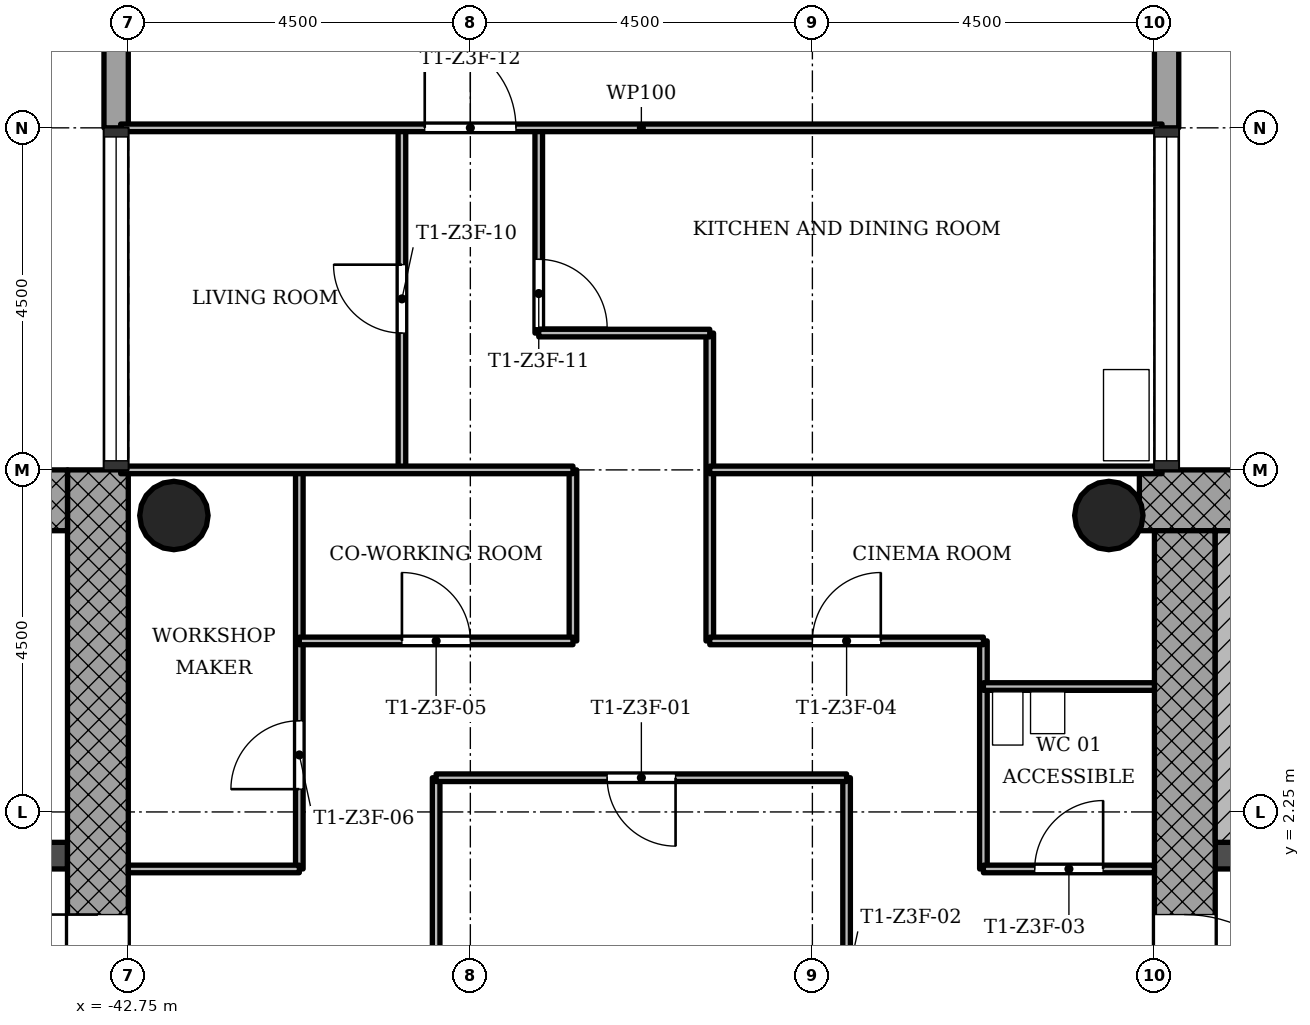
"""IFC4 building model, lengths in metres.
Left out: names, types, materials, properties, quantities, classifications, styles, units other than length and angle.
Written with IfcOpenShell. Run it as: python <this file> out.ifc"""

import sys

from ifc_helpers import new_model, si_unit, direction, frame, frame_2d, origin, origin_2d, place, context, subcontext, project, spatial, rectangle, hollow_circle, extrude, element, fill, save


model = new_model("IFC4")
c1 = context("Model", 3, precision=1e-05, world=origin(), true_north=direction((0.0, 1.0)))
c2 = subcontext(c1, "Body", "Model", "MODEL_VIEW")
j1 = project(units=[si_unit("LENGTHUNIT", "METRE"), si_unit("PLANEANGLEUNIT", "RADIAN")], contexts=[c1])
p1 = place(None, origin())
s1 = spatial("IfcSite", under=j1, at=p1, CompositionType="ELEMENT")
p2 = place(p1, origin())
s2 = spatial("IfcBuilding", under=s1, at=p2, CompositionType="ELEMENT")
p3 = place(p2, frame((0.0, 0.0, 171.1)))
s3 = spatial("IfcBuildingStorey", under=s2, at=p3, CompositionType="ELEMENT", Elevation=171.1)
p4 = place(p3, frame((-20.652, 6.35, 0.0), z_axis=(0.0, 0.0, 1.0), x_axis=(-1.0, 0.0, 0.0)))
e1 = element("IfcWall", 1, at=p4, inside=s3, PredefinedType="SHEAR", context=c2, shape_type="SweptSolid", body=[
    extrude(rectangle(XDim=8.796, YDim=0.8, at=frame_2d((4.398, 0.0))), origin(), (0.0, 0.0, 1.0), 3.4),
])
p5 = place(p3, frame((-28.85, 5.95, 0.0), z_axis=(0.0, 0.0, 1.0), x_axis=(0.0, -1.0, 0.0)))
e2 = element("IfcWall", 2, at=p5, inside=s3, PredefinedType="SHEAR", context=c2, shape_type="SweptSolid", body=[
    extrude(rectangle(XDim=12.7, YDim=0.8, at=frame_2d((6.35, 0.0))), origin(), (0.0, 0.0, 1.0), 3.4),
])
p6 = place(p5, frame((5.05, 0.0, 0.0)))
e3 = element("IfcOpeningElement", 3, at=p6, cuts=e2, PredefinedType="OPENING", context=c2, shape_type="SweptSolid", body=[
    extrude(rectangle(XDim=1.8, YDim=2.1, at=frame_2d((0.9, 1.05))), frame((0.0, 0.41, 0.0), z_axis=(0.0, -1.0, 0.0), x_axis=(1.0, 0.0, 0.0)), (0.0, 0.0, 1.0), 0.82),
])
p7 = place(p3, frame((-28.45, 1.675, 0.0), z_axis=(0.0, 0.0, 1.0), x_axis=(1.0, 0.0, 0.0)))
e4 = element("IfcWall", 4, at=p7, inside=s3, PredefinedType="SHEAR", context=c2, shape_type="SweptSolid", body=[
    extrude(rectangle(XDim=7.4, YDim=0.35, at=frame_2d((3.7, 0.0))), origin(), (0.0, 0.0, 1.0), 3.4),
])
p8 = place(p7, frame((0.85, 0.0, 0.0)))
e5 = element("IfcOpeningElement", 5, at=p8, cuts=e4, PredefinedType="OPENING", context=c2, shape_type="SweptSolid", body=[
    extrude(rectangle(XDim=0.9, YDim=2.1, at=frame_2d((0.45, 1.05))), frame((0.0, 0.185, 0.0), z_axis=(0.0, -1.0, 0.0), x_axis=(1.0, 0.0, 0.0)), (0.0, 0.0, 1.0), 0.37),
])
p9 = place(p3, frame((-43.15, -5.95, 0.0), z_axis=(0.0, 0.0, 1.0), x_axis=(0.0, 1.0, 0.0)))
e6 = element("IfcWall", 6, at=p9, inside=s3, PredefinedType="SHEAR", context=c2, shape_type="SweptSolid", body=[
    extrude(rectangle(XDim=12.7, YDim=0.8, at=frame_2d((6.35, 0.0))), origin(), (0.0, 0.0, 1.0), 3.4),
])
p10 = place(p9, frame((5.05, 0.0, 0.0)))
e7 = element("IfcOpeningElement", 7, at=p10, cuts=e6, PredefinedType="OPENING", context=c2, shape_type="SweptSolid", body=[
    extrude(rectangle(XDim=1.8, YDim=2.1, at=frame_2d((0.9, 1.05))), frame((0.0, 0.41, 0.0), z_axis=(0.0, -1.0, 0.0), x_axis=(1.0, 0.0, 0.0)), (0.0, 0.0, 1.0), 0.82),
])
p11 = place(p3, frame((-43.55, 6.35, 0.0), z_axis=(0.0, 0.0, 1.0), x_axis=(-1.0, 0.0, 0.0)))
e8 = element("IfcWall", 8, at=p11, inside=s3, PredefinedType="SHEAR", context=c2, shape_type="SweptSolid", body=[
    extrude(rectangle(XDim=8.2, YDim=0.8, at=frame_2d((4.1, 0.0))), origin(), (0.0, 0.0, 1.0), 3.4),
])
p12 = place(p3, frame((-50.95, 1.675, 0.0), z_axis=(0.0, 0.0, 1.0), x_axis=(1.0, 0.0, 0.0)))
e9 = element("IfcWall", 9, at=p12, inside=s3, PredefinedType="SHEAR", context=c2, shape_type="SweptSolid", body=[
    extrude(rectangle(XDim=7.4, YDim=0.35, at=frame_2d((3.7, 0.0))), origin(), (0.0, 0.0, 1.0), 3.4),
])
p13 = place(p12, frame((5.35, 0.0, 0.0)))
e10 = element("IfcOpeningElement", 10, at=p13, cuts=e9, PredefinedType="OPENING", context=c2, shape_type="SweptSolid", body=[
    extrude(rectangle(XDim=1.1, YDim=2.1, at=frame_2d((0.55, 1.05))), frame((0.0, 0.185, 0.0), z_axis=(0.0, -1.0, 0.0), x_axis=(1.0, 0.0, 0.0)), (0.0, 0.0, 1.0), 0.37),
])
p14 = place(p12, frame((1.0, 0.0, 0.0)))
e11 = element("IfcOpeningElement", 11, at=p14, cuts=e9, PredefinedType="OPENING", context=c2, shape_type="SweptSolid", body=[
    extrude(rectangle(XDim=1.1, YDim=2.1, at=frame_2d((0.55, 1.05))), frame((0.0, 0.185, 0.0), z_axis=(0.0, -1.0, 0.0), x_axis=(1.0, 0.0, 0.0)), (0.0, 0.0, 1.0), 0.37),
])
p15 = place(p12, frame((3.3, 0.0, 0.0)))
e12 = element("IfcOpeningElement", 12, at=p15, cuts=e9, PredefinedType="OPENING", context=c2, shape_type="SweptSolid", body=[
    extrude(rectangle(XDim=0.9, YDim=2.1, at=frame_2d((0.45, 1.05))), frame((0.0, 0.185, 0.0), z_axis=(0.0, -1.0, 0.0), x_axis=(1.0, 0.0, 0.0)), (0.0, 0.0, 1.0), 0.37),
])
for number, where, z_axis, x_axis in (
    (13, (-29.85, 6.15, 0.0), (0.0, 0.0, 1.0), (1.0, 0.0, 0.0)),
    (14, (-42.15, 6.15, 0.0), (0.0, 0.0, 1.0), (1.0, 0.0, 0.0)),
):
    element("IfcColumn", number, at=place(p3, frame(where, z_axis=z_axis, x_axis=x_axis)), inside=s3, PredefinedType="COLUMN", context=c2, shape_type="SweptSolid", body=[
        extrude(hollow_circle(Radius=0.45, WallThickness=0.032, at=origin_2d()), origin(), (0.0, 0.0, 1.0), 3.4),
    ])
p16 = place(p3, frame((-29.09, 11.25, -0.3), z_axis=(0.0, 0.0, 1.0), x_axis=(0.0, 1.0, 0.0)))
e15 = element("IfcWall", 15, at=p16, inside=s3, PredefinedType="STANDARD", context=c2, shape_type="SweptSolid", body=[
    extrude(rectangle(XDim=1.82, YDim=0.32, at=frame_2d((0.91, 0.0))), origin(), (0.0, 0.0, 1.0), 3.4),
])
p17 = place(p3, frame((-42.91, 12.75, -0.3), z_axis=(0.0, 0.0, 1.0), x_axis=(0.0, -1.0, 0.0)))
e16 = element("IfcWall", 16, at=p17, inside=s3, PredefinedType="STANDARD", context=c2, shape_type="SweptSolid", body=[
    extrude(rectangle(XDim=1.5, YDim=0.32, at=frame_2d((0.75, 0.0))), origin(), (0.0, 0.0, 1.0), 3.4),
])
p18 = place(p3, frame((-40.5, 1.5, 0.0), z_axis=(0.0, 0.0, 1.0), x_axis=(0.0, 1.0, 0.0)))
e17 = element("IfcWall", 17, at=p18, inside=s3, PredefinedType="PARTITIONING", context=c2, shape_type="SweptSolid", body=[
    extrude(rectangle(XDim=5.25, YDim=0.1, at=frame_2d((2.625, 0.0))), origin(), (0.0, 0.0, 1.0), 3.0),
])
p19 = place(p18, frame((1.05, 0.0, 0.0)))
e18 = element("IfcOpeningElement", 18, at=p19, cuts=e17, PredefinedType="OPENING", context=c2, shape_type="SweptSolid", body=[
    extrude(rectangle(XDim=0.9, YDim=2.1, at=frame_2d((0.45, 1.05))), frame((0.0, 0.06, 0.0), z_axis=(0.0, -1.0, 0.0), x_axis=(1.0, 0.0, 0.0)), (0.0, 0.0, 1.0), 0.12),
])
p20 = place(p3, frame((-39.15, 6.75, 0.0), z_axis=(0.0, 0.0, 1.0), x_axis=(0.0, 1.0, 0.0)))
e19 = element("IfcWall", 19, at=p20, inside=s3, PredefinedType="PARTITIONING", context=c2, shape_type="SweptSolid", body=[
    extrude(rectangle(XDim=4.5, YDim=0.1, at=frame_2d((2.25, 0.0))), origin(), (0.0, 0.0, 1.0), 3.0),
])
p21 = place(p20, frame((1.8, 0.0, 0.0)))
e20 = element("IfcOpeningElement", 20, at=p21, cuts=e19, PredefinedType="OPENING", context=c2, shape_type="SweptSolid", body=[
    extrude(rectangle(XDim=0.9, YDim=2.1, at=frame_2d((0.45, 1.05))), frame((0.0, 0.06, 0.0), z_axis=(0.0, -1.0, 0.0), x_axis=(1.0, 0.0, 0.0)), (0.0, 0.0, 1.0), 0.12),
])
p22 = place(p3, frame((-38.7, -2.7, 0.0), z_axis=(0.0, 0.0, 1.0), x_axis=(0.0, 1.0, 0.0)))
e21 = element("IfcWall", 21, at=p22, inside=s3, PredefinedType="PARTITIONING", context=c2, shape_type="SweptSolid", body=[
    extrude(rectangle(XDim=5.4, YDim=0.1, at=frame_2d((2.7, 0.0))), origin(), (0.0, 0.0, 1.0), 3.0),
])
p23 = place(p3, frame((-37.35, 8.55, 0.0), z_axis=(0.0, 0.0, 1.0), x_axis=(0.0, 1.0, 0.0)))
e22 = element("IfcWall", 22, at=p23, inside=s3, PredefinedType="PARTITIONING", context=c2, shape_type="SweptSolid", body=[
    extrude(rectangle(XDim=2.7, YDim=0.1, at=frame_2d((1.35, 0.0))), origin(), (0.0, 0.0, 1.0), 3.0),
])
p24 = place(p23, frame((0.07, 0.0, 0.0)))
e23 = element("IfcOpeningElement", 23, at=p24, cuts=e22, PredefinedType="OPENING", context=c2, shape_type="SweptSolid", body=[
    extrude(rectangle(XDim=0.9, YDim=2.1, at=frame_2d((0.45, 1.05))), frame((0.0, 0.06, 0.0), z_axis=(0.0, -1.0, 0.0), x_axis=(1.0, 0.0, 0.0)), (0.0, 0.0, 1.0), 0.12),
])
p25 = place(p3, frame((-36.9, 4.5, 0.0), z_axis=(0.0, 0.0, 1.0), x_axis=(0.0, 1.0, 0.0)))
e24 = element("IfcWall", 24, at=p25, inside=s3, PredefinedType="PARTITIONING", context=c2, shape_type="SweptSolid", body=[
    extrude(rectangle(XDim=2.25, YDim=0.1, at=frame_2d((1.125, 0.0))), origin(), (0.0, 0.0, 1.0), 3.0),
])
p26 = place(p3, frame((-35.1, 4.5, 0.0), z_axis=(0.0, 0.0, 1.0), x_axis=(0.0, 1.0, 0.0)))
e25 = element("IfcWall", 25, at=p26, inside=s3, PredefinedType="PARTITIONING", context=c2, shape_type="SweptSolid", body=[
    extrude(rectangle(XDim=4.05, YDim=0.1, at=frame_2d((2.025, 0.0))), origin(), (0.0, 0.0, 1.0), 3.0),
])
p27 = place(p3, frame((-33.3, -2.7, 0.0), z_axis=(0.0, 0.0, 1.0), x_axis=(0.0, 1.0, 0.0)))
e26 = element("IfcWall", 26, at=p27, inside=s3, PredefinedType="PARTITIONING", context=c2, shape_type="SweptSolid", body=[
    extrude(rectangle(XDim=5.4, YDim=0.1, at=frame_2d((2.7, 0.0))), origin(), (0.0, 0.0, 1.0), 3.0),
])
p28 = place(p27, frame((2.25, 0.0, 0.0)))
e27 = element("IfcOpeningElement", 27, at=p28, cuts=e26, PredefinedType="OPENING", context=c2, shape_type="SweptSolid", body=[
    extrude(rectangle(XDim=0.9, YDim=2.1, at=frame_2d((0.45, 1.05))), frame((0.0, 0.06, 0.0), z_axis=(0.0, -1.0, 0.0), x_axis=(1.0, 0.0, 0.0)), (0.0, 0.0, 1.0), 0.12),
])
p29 = place(p3, frame((-31.5, 1.5, 0.0), z_axis=(0.0, 0.0, 1.0), x_axis=(0.0, 1.0, 0.0)))
e28 = element("IfcWall", 28, at=p29, inside=s3, PredefinedType="PARTITIONING", context=c2, shape_type="SweptSolid", body=[
    extrude(rectangle(XDim=3.0, YDim=0.1, at=frame_2d((1.5, 0.0))), origin(), (0.0, 0.0, 1.0), 3.0),
])
p30 = place(p3, frame((-42.75, 1.5, 0.0), z_axis=(0.0, 0.0, 1.0), x_axis=(1.0, 0.0, 0.0)))
e29 = element("IfcWall", 29, at=p30, inside=s3, PredefinedType="PARTITIONING", context=c2, shape_type="SweptSolid", body=[
    extrude(rectangle(XDim=2.25, YDim=0.1, at=frame_2d((1.125, 0.0))), origin(), (0.0, 0.0, 1.0), 3.0),
])
p31 = place(p3, frame((-31.5, 1.5, 0.0), z_axis=(0.0, 0.0, 1.0), x_axis=(1.0, 0.0, 0.0)))
e30 = element("IfcWall", 30, at=p31, inside=s3, PredefinedType="PARTITIONING", context=c2, shape_type="SweptSolid", body=[
    extrude(rectangle(XDim=2.25, YDim=0.1, at=frame_2d((1.125, 0.0))), origin(), (0.0, 0.0, 1.0), 3.0),
])
p32 = place(p31, frame((0.675, 0.0, 0.0)))
e31 = element("IfcOpeningElement", 31, at=p32, cuts=e30, PredefinedType="OPENING", context=c2, shape_type="SweptSolid", body=[
    extrude(rectangle(XDim=0.9, YDim=2.1, at=frame_2d((0.45, 1.05))), frame((0.0, 0.06, 0.0), z_axis=(0.0, -1.0, 0.0), x_axis=(1.0, 0.0, 0.0)), (0.0, 0.0, 1.0), 0.12),
])
p33 = place(p3, frame((-38.7, 2.7, 0.0), z_axis=(0.0, 0.0, 1.0), x_axis=(1.0, 0.0, 0.0)))
e32 = element("IfcWall", 32, at=p33, inside=s3, PredefinedType="PARTITIONING", context=c2, shape_type="SweptSolid", body=[
    extrude(rectangle(XDim=5.4, YDim=0.1, at=frame_2d((2.7, 0.0))), origin(), (0.0, 0.0, 1.0), 3.0),
])
p34 = place(p33, frame((2.25, 0.0, 0.0)))
e33 = element("IfcOpeningElement", 33, at=p34, cuts=e32, PredefinedType="OPENING", context=c2, shape_type="SweptSolid", body=[
    extrude(rectangle(XDim=0.9, YDim=2.1, at=frame_2d((0.45, 1.05))), frame((0.0, 0.06, 0.0), z_axis=(0.0, -1.0, 0.0), x_axis=(1.0, 0.0, 0.0)), (0.0, 0.0, 1.0), 0.12),
])
p35 = place(p3, frame((-31.5, 3.9, 0.0), z_axis=(0.0, 0.0, 1.0), x_axis=(1.0, 0.0, 0.0)))
e34 = element("IfcWall", 34, at=p35, inside=s3, PredefinedType="PARTITIONING", context=c2, shape_type="SweptSolid", body=[
    extrude(rectangle(XDim=2.25, YDim=0.1, at=frame_2d((1.125, 0.0))), origin(), (0.0, 0.0, 1.0), 3.0),
])
p36 = place(p3, frame((-40.5, 4.5, 0.0), z_axis=(0.0, 0.0, 1.0), x_axis=(1.0, 0.0, 0.0)))
e35 = element("IfcWall", 35, at=p36, inside=s3, PredefinedType="PARTITIONING", context=c2, shape_type="SweptSolid", body=[
    extrude(rectangle(XDim=3.6, YDim=0.1, at=frame_2d((1.8, 0.0))), origin(), (0.0, 0.0, 1.0), 3.0),
])
p37 = place(p36, frame((1.35, 0.0, 0.0)))
e36 = element("IfcOpeningElement", 36, at=p37, cuts=e35, PredefinedType="OPENING", context=c2, shape_type="SweptSolid", body=[
    extrude(rectangle(XDim=0.9, YDim=2.1, at=frame_2d((0.45, 1.05))), frame((0.0, 0.06, 0.0), z_axis=(0.0, -1.0, 0.0), x_axis=(1.0, 0.0, 0.0)), (0.0, 0.0, 1.0), 0.12),
])
p38 = place(p3, frame((-35.1, 4.5, 0.0), z_axis=(0.0, 0.0, 1.0), x_axis=(1.0, 0.0, 0.0)))
e37 = element("IfcWall", 37, at=p38, inside=s3, PredefinedType="PARTITIONING", context=c2, shape_type="SweptSolid", body=[
    extrude(rectangle(XDim=3.6, YDim=0.1, at=frame_2d((1.8, 0.0))), origin(), (0.0, 0.0, 1.0), 3.0),
])
p39 = place(p38, frame((1.35, 0.0, 0.0)))
e38 = element("IfcOpeningElement", 38, at=p39, cuts=e37, PredefinedType="OPENING", context=c2, shape_type="SweptSolid", body=[
    extrude(rectangle(XDim=0.9, YDim=2.1, at=frame_2d((0.45, 1.05))), frame((0.0, 0.06, 0.0), z_axis=(0.0, -1.0, 0.0), x_axis=(1.0, 0.0, 0.0)), (0.0, 0.0, 1.0), 0.12),
])
for number, where, z_axis, x_axis in (
    (39, (-42.85, 6.75, 0.0), (0.0, 0.0, 1.0), (1.0, 0.0, 0.0)),
    (40, (-35.1, 6.75, 0.0), (0.0, 0.0, 1.0), (1.0, 0.0, 0.0)),
):
    element("IfcWall", number, at=place(p3, frame(where, z_axis=z_axis, x_axis=x_axis)), inside=s3, PredefinedType="PARTITIONING", context=c2, shape_type="SweptSolid", body=[
        extrude(rectangle(XDim=5.95, YDim=0.1, at=frame_2d((2.975, 0.0))), origin(), (0.0, 0.0, 1.0), 3.0),
    ])
p40 = place(p3, frame((-37.35, 8.55, 0.0), z_axis=(0.0, 0.0, 1.0), x_axis=(1.0, 0.0, 0.0)))
e41 = element("IfcWall", 41, at=p40, inside=s3, PredefinedType="PARTITIONING", context=c2, shape_type="SweptSolid", body=[
    extrude(rectangle(XDim=2.25, YDim=0.1, at=frame_2d((1.125, 0.0))), origin(), (0.0, 0.0, 1.0), 3.0),
])
p41 = place(p3, frame((-42.85, 11.25, 0.0), z_axis=(0.0, 0.0, 1.0), x_axis=(1.0, 0.0, 0.0)))
e42 = element("IfcWall", 42, at=p41, inside=s3, PredefinedType="PARTITIONING", context=c2, shape_type="SweptSolid", body=[
    extrude(rectangle(XDim=13.7, YDim=0.1, at=frame_2d((6.85, 0.0))), origin(), (0.0, 0.0, 1.0), 3.0),
])
p42 = place(p41, frame((4.0, 0.0, 0.0)))
e43 = element("IfcOpeningElement", 43, at=p42, cuts=e42, PredefinedType="OPENING", context=c2, shape_type="SweptSolid", body=[
    extrude(rectangle(XDim=1.2, YDim=2.1, at=frame_2d((0.6, 1.05))), frame((0.0, 0.06, 0.0), z_axis=(0.0, -1.0, 0.0), x_axis=(1.0, 0.0, 0.0)), (0.0, 0.0, 1.0), 0.12),
])
p43 = place(p3, frame((-28.25, 1.85, 0.0), z_axis=(0.0, 0.0, 1.0), x_axis=(0.0, 1.0, 0.0)))
e44 = element("IfcWall", 44, at=p43, inside=s3, PredefinedType="SHEAR", context=c2, shape_type="SweptSolid", body=[
    extrude(rectangle(XDim=4.1, YDim=0.4, at=frame_2d((2.05, 0.0))), origin(), (0.0, 0.0, 1.0), 3.4),
])
p44 = place(p34, origin())
e45 = element("IfcDoor", 45, at=p44, inside=s3, OperationType="SINGLE_SWING_RIGHT", PredefinedType="DOOR", context=c2, shape_type="SweptSolid", body=[
    extrude(rectangle(XDim=0.9, YDim=2.1, at=frame_2d((0.45, 1.05))), frame((0.0, 0.025, 0.0), z_axis=(0.0, -1.0, 0.0), x_axis=(1.0, 0.0, 0.0)), (0.0, 0.0, 1.0), 0.05),
])
fill(e33, e45)
p45 = place(p32, origin())
e46 = element("IfcDoor", 46, at=p45, inside=s3, OperationType="SINGLE_SWING_LEFT", PredefinedType="DOOR", context=c2, shape_type="SweptSolid", body=[
    extrude(rectangle(XDim=0.9, YDim=2.1, at=frame_2d((0.45, 1.05))), frame((0.0, 0.025, 0.0), z_axis=(0.0, -1.0, 0.0), x_axis=(1.0, 0.0, 0.0)), (0.0, 0.0, 1.0), 0.05),
])
fill(e31, e46)
p46 = place(p39, origin())
e47 = element("IfcDoor", 47, at=p46, inside=s3, OperationType="SINGLE_SWING_LEFT", PredefinedType="DOOR", context=c2, shape_type="SweptSolid", body=[
    extrude(rectangle(XDim=0.9, YDim=2.1, at=frame_2d((0.45, 1.05))), frame((0.0, 0.025, 0.0), z_axis=(0.0, -1.0, 0.0), x_axis=(1.0, 0.0, 0.0)), (0.0, 0.0, 1.0), 0.05),
])
fill(e38, e47)
p47 = place(p37, origin())
e48 = element("IfcDoor", 48, at=p47, inside=s3, OperationType="SINGLE_SWING_RIGHT", PredefinedType="DOOR", context=c2, shape_type="SweptSolid", body=[
    extrude(rectangle(XDim=0.9, YDim=2.1, at=frame_2d((0.45, 1.05))), frame((0.0, 0.025, 0.0), z_axis=(0.0, -1.0, 0.0), x_axis=(1.0, 0.0, 0.0)), (0.0, 0.0, 1.0), 0.05),
])
fill(e36, e48)
p48 = place(p19, origin())
e49 = element("IfcDoor", 49, at=p48, inside=s3, OperationType="SINGLE_SWING_RIGHT", PredefinedType="DOOR", context=c2, shape_type="SweptSolid", body=[
    extrude(rectangle(XDim=0.9, YDim=2.1, at=frame_2d((0.45, 1.05))), frame((0.0, 0.025, 0.0), z_axis=(0.0, -1.0, 0.0), x_axis=(1.0, 0.0, 0.0)), (0.0, 0.0, 1.0), 0.05),
])
fill(e18, e49)
p49 = place(p21, origin())
e50 = element("IfcDoor", 50, at=p49, inside=s3, OperationType="SINGLE_SWING_LEFT", PredefinedType="DOOR", context=c2, shape_type="SweptSolid", body=[
    extrude(rectangle(XDim=0.9, YDim=2.1, at=frame_2d((0.45, 1.05))), frame((0.0, 0.025, 0.0), z_axis=(0.0, -1.0, 0.0), x_axis=(1.0, 0.0, 0.0)), (0.0, 0.0, 1.0), 0.05),
])
fill(e20, e50)
p50 = place(p24, origin())
e51 = element("IfcDoor", 51, at=p50, inside=s3, OperationType="SINGLE_SWING_LEFT", PredefinedType="DOOR", context=c2, shape_type="SweptSolid", body=[
    extrude(rectangle(XDim=0.9, YDim=2.1, at=frame_2d((0.45, 1.05))), frame((0.0, 0.025, 0.0), z_axis=(0.0, -1.0, 0.0), x_axis=(1.0, 0.0, 0.0)), (0.0, 0.0, 1.0), 0.05),
])
fill(e23, e51)
p51 = place(p42, origin())
e52 = element("IfcDoor", 52, at=p51, inside=s3, OperationType="SINGLE_SWING_RIGHT", PredefinedType="DOOR", context=c2, shape_type="SweptSolid", body=[
    extrude(rectangle(XDim=1.2, YDim=2.1, at=frame_2d((0.6, 1.05))), frame((0.0, 0.025, 0.0), z_axis=(0.0, -1.0, 0.0), x_axis=(1.0, 0.0, 0.0)), (0.0, 0.0, 1.0), 0.05),
])
fill(e43, e52)
p52 = place(p6, origin())
e53 = element("IfcDoor", 53, at=p52, inside=s3, OperationType="SINGLE_SWING_LEFT", PredefinedType="DOOR", context=c2, shape_type="SweptSolid", body=[
    extrude(rectangle(XDim=1.8, YDim=2.1, at=frame_2d((0.9, 1.05))), frame((0.0, 0.025, 0.0), z_axis=(0.0, -1.0, 0.0), x_axis=(1.0, 0.0, 0.0)), (0.0, 0.0, 1.0), 0.05),
])
fill(e3, e53)
p53 = place(p10, origin())
e54 = element("IfcDoor", 54, at=p53, inside=s3, OperationType="SINGLE_SWING_LEFT", PredefinedType="DOOR", context=c2, shape_type="SweptSolid", body=[
    extrude(rectangle(XDim=1.8, YDim=2.1, at=frame_2d((0.9, 1.05))), frame((0.0, 0.025, 0.0), z_axis=(0.0, -1.0, 0.0), x_axis=(1.0, 0.0, 0.0)), (0.0, 0.0, 1.0), 0.05),
])
fill(e7, e54)
save(model, sys.argv[1])
